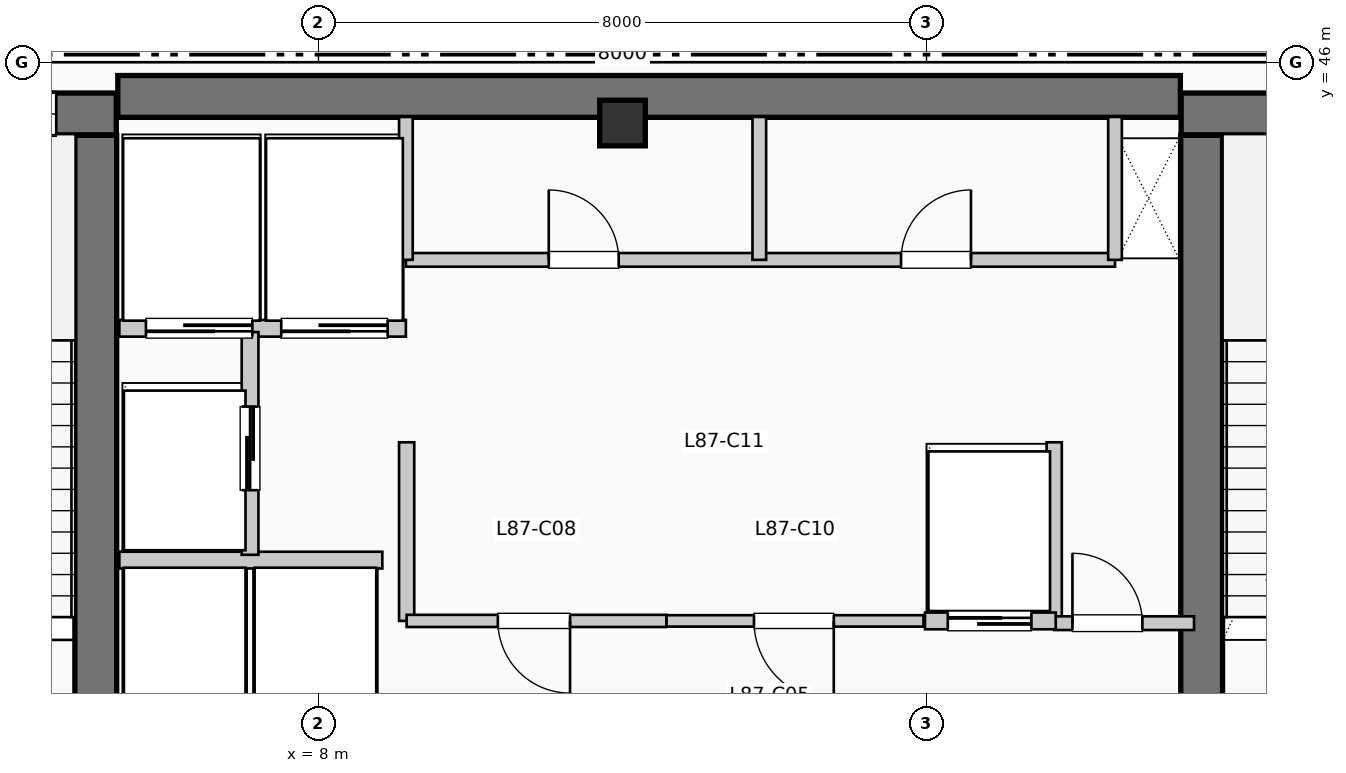
"""IFC4 building model, lengths in metres.
Left out: names, types, materials, properties, quantities, classifications, styles, units other than length and angle.
Written with IfcOpenShell. Run it as: python <this file> out.ifc"""

import sys

from ifc_helpers import new_model, si_unit, direction, frame, frame_2d, origin, origin_2d, place, context, subcontext, project, spatial, rectangle, extrude, element, fill, save


model = new_model("IFC4")
c1 = context("Model", 3, precision=1e-05, world=origin(), true_north=direction((0.0, 1.0)))
c2 = subcontext(c1, "Body", "Model", "MODEL_VIEW")
j1 = project(units=[si_unit("LENGTHUNIT", "METRE"), si_unit("PLANEANGLEUNIT", "RADIAN")], contexts=[c1])
p1 = place(None, origin())
s1 = spatial("IfcSite", under=j1, at=p1, CompositionType="ELEMENT")
p2 = place(p1, origin())
s2 = spatial("IfcBuilding", under=s1, at=p2, CompositionType="ELEMENT")
p3 = place(p2, frame((0.0, 0.0, 356.73)))
s3 = spatial("IfcBuildingStorey", under=s2, at=p3, CompositionType="ELEMENT", Elevation=356.73)
p4 = place(p3, frame((5.36, 45.55, 0.0), z_axis=(0.0, 0.0, 1.0), x_axis=(1.0, 0.0, 0.0)))
e1 = element("IfcWall", 1, at=p4, inside=s3, PredefinedType="SHEAR", context=c2, shape_type="SweptSolid", body=[
    extrude(rectangle(XDim=13.98, YDim=0.55, at=frame_2d((6.99, 0.0))), origin(), (0.0, 0.0, 1.0), 4.62),
])
p5 = place(p3, frame((5.07, 37.15, 0.0), z_axis=(0.0, 0.0, 1.0), x_axis=(0.0, 1.0, 0.0)))
e2 = element("IfcWall", 2, at=p5, inside=s3, PredefinedType="SHEAR", context=c2, shape_type="SweptSolid", body=[
    extrude(rectangle(XDim=7.89, YDim=0.55, at=frame_2d((3.945, 0.0))), origin(), (0.0, 0.0, 1.0), 4.62),
])
p6 = place(p3, frame((1.1, 45.32, 0.0), z_axis=(0.0, 0.0, 1.0), x_axis=(1.0, 0.0, 0.0)))
e3 = element("IfcWall", 3, at=p6, inside=s3, PredefinedType="SHEAR", context=c2, shape_type="SweptSolid", body=[
    extrude(rectangle(XDim=4.24, YDim=0.55, at=frame_2d((2.12, 0.0))), origin(), (0.0, 0.0, 1.0), 4.62),
])
p7 = place(p6, frame((2.05, 0.0, 1.05)))
e4 = element("IfcOpeningElement", 4, at=p7, cuts=e3, PredefinedType="OPENING", context=c2, shape_type="SweptSolid", body=[
    extrude(rectangle(XDim=1.4, YDim=1.8, at=frame_2d((0.7, 0.9))), frame((0.0, 0.285, 0.0), z_axis=(0.0, -1.0, 0.0), x_axis=(1.0, 0.0, 0.0)), (0.0, 0.0, 1.0), 0.57),
])
p8 = place(p3, frame((19.62, 37.15, 0.0), z_axis=(0.0, 0.0, 1.0), x_axis=(0.0, 1.0, 0.0)))
e5 = element("IfcWall", 5, at=p8, inside=s3, PredefinedType="SHEAR", context=c2, shape_type="SweptSolid", body=[
    extrude(rectangle(XDim=7.89, YDim=0.55, at=frame_2d((3.945, 0.0))), origin(), (0.0, 0.0, 1.0), 4.62),
])
p9 = place(p3, frame((19.35, 45.32, 0.0), z_axis=(0.0, 0.0, 1.0), x_axis=(1.0, 0.0, 0.0)))
e6 = element("IfcWall", 6, at=p9, inside=s3, PredefinedType="SHEAR", context=c2, shape_type="SweptSolid", body=[
    extrude(rectangle(XDim=3.69, YDim=0.55, at=frame_2d((1.845, 0.0))), origin(), (0.0, 0.0, 1.0), 4.62),
])
p10 = place(p9, frame((1.15, 0.0, 1.05)))
e7 = element("IfcOpeningElement", 7, at=p10, cuts=e6, PredefinedType="OPENING", context=c2, shape_type="SweptSolid", body=[
    extrude(rectangle(XDim=1.4, YDim=1.8, at=frame_2d((0.7, 0.9))), frame((0.0, 0.285, 0.0), z_axis=(0.0, -1.0, 0.0), x_axis=(1.0, 0.0, 0.0)), (0.0, 0.0, 1.0), 0.57),
])
p11 = place(p3, frame((12.0, 45.2, 0.0), z_axis=(0.0, 0.0, 1.0), x_axis=(1.0, 0.0, 0.0)))
e8 = element("IfcColumn", 8, at=p11, inside=s3, PredefinedType="COLUMN", context=c2, shape_type="SweptSolid", body=[
    extrude(rectangle(XDim=0.6, YDim=0.6, at=origin_2d()), origin(), (0.0, 0.0, 1.0), 4.62),
])
p12 = place(p3, frame((5.38, 39.45, 0.0), z_axis=(0.0, 0.0, 1.0), x_axis=(1.0, 0.0, 0.0)))
e9 = element("IfcWall", 9, at=p12, inside=s3, PredefinedType="PARTITIONING", context=c2, shape_type="SweptSolid", body=[
    extrude(rectangle(XDim=3.46, YDim=0.22, at=frame_2d((1.73, 0.0))), origin(), (0.0, 0.0, 1.0), 4.37),
])
p13 = place(p3, frame((5.38, 42.5, 0.0), z_axis=(0.0, 0.0, 1.0), x_axis=(1.0, 0.0, 0.0)))
e10 = element("IfcWall", 10, at=p13, inside=s3, PredefinedType="PARTITIONING", context=c2, shape_type="SweptSolid", body=[
    extrude(rectangle(XDim=3.77, YDim=0.22, at=frame_2d((1.885, 0.0))), origin(), (0.0, 0.0, 1.0), 4.37),
])
p14 = place(p13, frame((1.75, 0.0, 0.0), z_axis=(0.0, 0.0, 1.0), x_axis=(-1.0, 0.0, 0.0)))
e11 = element("IfcOpeningElement", 11, at=p14, cuts=e10, PredefinedType="OPENING", context=c2, shape_type="SweptSolid", body=[
    extrude(rectangle(XDim=1.4, YDim=2.2, at=frame_2d((0.7, 1.1))), frame((0.0, 0.12, 0.0), z_axis=(0.0, -1.0, 0.0), x_axis=(1.0, 0.0, 0.0)), (0.0, 0.0, 1.0), 0.24),
])
p15 = place(p13, frame((3.53, 0.0, 0.0), z_axis=(0.0, 0.0, 1.0), x_axis=(-1.0, 0.0, 0.0)))
e12 = element("IfcOpeningElement", 12, at=p15, cuts=e10, PredefinedType="OPENING", context=c2, shape_type="SweptSolid", body=[
    extrude(rectangle(XDim=1.4, YDim=2.2, at=frame_2d((0.7, 1.1))), frame((0.0, 0.12, 0.0), z_axis=(0.0, -1.0, 0.0), x_axis=(1.0, 0.0, 0.0)), (0.0, 0.0, 1.0), 0.24),
])
p16 = place(p3, frame((7.1, 39.52, 0.0), z_axis=(0.0, 0.0, 1.0), x_axis=(0.0, 1.0, 0.0)))
e13 = element("IfcWall", 13, at=p16, inside=s3, PredefinedType="PARTITIONING", context=c2, shape_type="SweptSolid", body=[
    extrude(rectangle(XDim=2.93, YDim=0.22, at=frame_2d((1.465, 0.0))), origin(), (0.0, 0.0, 1.0), 4.37),
])
p17 = place(p16, frame((0.85, 0.0, 0.0)))
e14 = element("IfcOpeningElement", 14, at=p17, cuts=e13, PredefinedType="OPENING", context=c2, shape_type="SweptSolid", body=[
    extrude(rectangle(XDim=1.1, YDim=2.2, at=frame_2d((0.55, 1.1))), frame((0.0, 0.12, 0.0), z_axis=(0.0, -1.0, 0.0), x_axis=(1.0, 0.0, 0.0)), (0.0, 0.0, 1.0), 0.24),
])
for number, where, z_axis, x_axis in (
    (15, (9.16, 38.65, 0.0), (0.0, 0.0, 1.0), (0.0, 1.0, 0.0)),
    (16, (17.68, 38.65, 0.0), (0.0, 0.0, 1.0), (0.0, 1.0, 0.0)),
):
    element("IfcWall", number, at=place(p3, frame(where, z_axis=z_axis, x_axis=x_axis)), inside=s3, PredefinedType="PARTITIONING", context=c2, shape_type="SweptSolid", body=[
        extrude(rectangle(XDim=2.35, YDim=0.2, at=frame_2d((1.175, 0.0))), origin(), (0.0, 0.0, 1.0), 4.37),
    ])
p18 = place(p3, frame((17.68, 38.62, 0.0), z_axis=(0.0, 0.0, 1.0), x_axis=(1.0, 0.0, 0.0)))
e17 = element("IfcWall", 17, at=p18, inside=s3, PredefinedType="PARTITIONING", context=c2, shape_type="SweptSolid", body=[
    extrude(rectangle(XDim=1.84, YDim=0.18, at=frame_2d((0.92, 0.0))), origin(), (0.0, 0.0, 1.0), 4.37),
])
p19 = place(p18, frame((0.24, 0.0, 0.0)))
e18 = element("IfcOpeningElement", 18, at=p19, cuts=e17, PredefinedType="OPENING", context=c2, shape_type="SweptSolid", body=[
    extrude(rectangle(XDim=0.92, YDim=2.1, at=frame_2d((0.46, 1.05))), frame((0.0, 0.1, 0.0), z_axis=(0.0, -1.0, 0.0), x_axis=(1.0, 0.0, 0.0)), (0.0, 0.0, 1.0), 0.2),
])
p20 = place(p3, frame((9.16, 38.65, 0.0), z_axis=(0.0, 0.0, 1.0), x_axis=(1.0, 0.0, 0.0)))
e19 = element("IfcWall", 19, at=p20, inside=s3, PredefinedType="PARTITIONING", context=c2, shape_type="SweptSolid", body=[
    extrude(rectangle(XDim=3.42, YDim=0.16, at=frame_2d((1.71, 0.0))), origin(), (0.0, 0.0, 1.0), 4.37),
])
p21 = place(p20, frame((2.15, 0.0, 0.0), z_axis=(0.0, 0.0, 1.0), x_axis=(-1.0, 0.0, 0.0)))
e20 = element("IfcOpeningElement", 20, at=p21, cuts=e19, PredefinedType="OPENING", context=c2, shape_type="SweptSolid", body=[
    extrude(rectangle(XDim=0.95, YDim=2.15, at=frame_2d((0.475, 1.075))), frame((0.0, 0.09, 0.0), z_axis=(0.0, -1.0, 0.0), x_axis=(1.0, 0.0, 0.0)), (0.0, 0.0, 1.0), 0.18),
])
p22 = place(p3, frame((12.58, 38.65, 0.0), z_axis=(0.0, 0.0, 1.0), x_axis=(1.0, 0.0, 0.0)))
e21 = element("IfcWall", 21, at=p22, inside=s3, PredefinedType="PARTITIONING", context=c2, shape_type="SweptSolid", body=[
    extrude(rectangle(XDim=3.38, YDim=0.15, at=frame_2d((1.69, 0.0))), origin(), (0.0, 0.0, 1.0), 4.37),
])
p23 = place(p22, frame((2.2, 0.0, 0.0), z_axis=(0.0, 0.0, 1.0), x_axis=(-1.0, 0.0, 0.0)))
e22 = element("IfcOpeningElement", 22, at=p23, cuts=e21, PredefinedType="OPENING", context=c2, shape_type="SweptSolid", body=[
    extrude(rectangle(XDim=1.05, YDim=2.15, at=frame_2d((0.525, 1.075))), frame((0.0, 0.085, 0.0), z_axis=(0.0, -1.0, 0.0), x_axis=(1.0, 0.0, 0.0)), (0.0, 0.0, 1.0), 0.17),
])
p24 = place(p3, frame((15.98, 38.65, 0.0), z_axis=(0.0, 0.0, 1.0), x_axis=(1.0, 0.0, 0.0)))
e23 = element("IfcWall", 23, at=p24, inside=s3, PredefinedType="PARTITIONING", context=c2, shape_type="SweptSolid", body=[
    extrude(rectangle(XDim=1.72, YDim=0.22, at=frame_2d((0.86, 0.0))), origin(), (0.0, 0.0, 1.0), 4.37),
])
p25 = place(p24, frame((0.3, 0.0, 0.0)))
e24 = element("IfcOpeningElement", 24, at=p25, cuts=e23, PredefinedType="OPENING", context=c2, shape_type="SweptSolid", body=[
    extrude(rectangle(XDim=1.1, YDim=2.2, at=frame_2d((0.55, 1.1))), frame((0.0, 0.12, 0.0), z_axis=(0.0, -1.0, 0.0), x_axis=(1.0, 0.0, 0.0)), (0.0, 0.0, 1.0), 0.24),
])
p26 = place(p3, frame((9.15, 43.4, 0.0), z_axis=(0.0, 0.0, 1.0), x_axis=(1.0, 0.0, 0.0)))
e25 = element("IfcWall", 25, at=p26, inside=s3, PredefinedType="PLUMBINGWALL", context=c2, shape_type="SweptSolid", body=[
    extrude(rectangle(XDim=9.33, YDim=0.18, at=frame_2d((4.665, 0.0))), origin(), (0.0, 0.0, 1.0), 4.37),
])
p27 = place(p26, frame((1.88, 0.0, 0.0)))
e26 = element("IfcOpeningElement", 26, at=p27, cuts=e25, PredefinedType="OPENING", context=c2, shape_type="SweptSolid", body=[
    extrude(rectangle(XDim=0.92, YDim=2.1, at=frame_2d((0.46, 1.05))), frame((0.0, 0.1, 0.0), z_axis=(0.0, -1.0, 0.0), x_axis=(1.0, 0.0, 0.0)), (0.0, 0.0, 1.0), 0.2),
])
p28 = place(p26, frame((6.515, 0.0, 0.0)))
e27 = element("IfcOpeningElement", 27, at=p28, cuts=e25, PredefinedType="OPENING", context=c2, shape_type="SweptSolid", body=[
    extrude(rectangle(XDim=0.92, YDim=2.1, at=frame_2d((0.46, 1.05))), frame((0.0, 0.1, 0.0), z_axis=(0.0, -1.0, 0.0), x_axis=(1.0, 0.0, 0.0)), (0.0, 0.0, 1.0), 0.2),
])
for number, where, z_axis, x_axis in (
    (28, (9.15, 43.4, 0.0), (0.0, 0.0, 1.0), (0.0, 1.0, 0.0)),
    (29, (18.48, 43.4, 0.0), (0.0, 0.0, 1.0), (0.0, 1.0, 0.0)),
    (30, (13.8, 43.4, 0.0), (0.0, 0.0, 1.0), (0.0, 1.0, 0.0)),
):
    element("IfcWall", number, at=place(p3, frame(where, z_axis=z_axis, x_axis=x_axis)), inside=s3, PredefinedType="PLUMBINGWALL", context=c2, shape_type="SweptSolid", body=[
        extrude(rectangle(XDim=1.88, YDim=0.18, at=frame_2d((0.94, 0.0))), origin(), (0.0, 0.0, 1.0), 4.37),
    ])
p29 = place(p7, origin())
e31 = element("IfcWindow", 31, at=p29, inside=s3, PartitioningType="SINGLE_PANEL", PredefinedType="WINDOW", context=c2, shape_type="SweptSolid", body=[
    extrude(rectangle(XDim=1.4, YDim=1.8, at=frame_2d((0.7, 0.9))), frame((0.0, 0.03, 0.0), z_axis=(0.0, -1.0, 0.0), x_axis=(1.0, 0.0, 0.0)), (0.0, 0.0, 1.0), 0.06),
])
fill(e4, e31)
p30 = place(p14, origin())
e32 = element("IfcDoor", 32, at=p30, inside=s3, OperationType="SLIDING_TO_LEFT", PredefinedType="DOOR", context=c2, shape_type="SweptSolid", body=[
    extrude(rectangle(XDim=1.4, YDim=2.2, at=frame_2d((0.7, 1.1))), frame((0.0, 0.025, 0.0), z_axis=(0.0, -1.0, 0.0), x_axis=(1.0, 0.0, 0.0)), (0.0, 0.0, 1.0), 0.05),
])
fill(e11, e32)
p31 = place(p15, origin())
e33 = element("IfcDoor", 33, at=p31, inside=s3, OperationType="SLIDING_TO_LEFT", PredefinedType="DOOR", context=c2, shape_type="SweptSolid", body=[
    extrude(rectangle(XDim=1.4, YDim=2.2, at=frame_2d((0.7, 1.1))), frame((0.0, 0.025, 0.0), z_axis=(0.0, -1.0, 0.0), x_axis=(1.0, 0.0, 0.0)), (0.0, 0.0, 1.0), 0.05),
])
fill(e12, e33)
p32 = place(p17, origin())
e34 = element("IfcDoor", 34, at=p32, inside=s3, OperationType="SLIDING_TO_LEFT", PredefinedType="DOOR", context=c2, shape_type="SweptSolid", body=[
    extrude(rectangle(XDim=1.1, YDim=2.2, at=frame_2d((0.55, 1.1))), frame((0.0, 0.025, 0.0), z_axis=(0.0, -1.0, 0.0), x_axis=(1.0, 0.0, 0.0)), (0.0, 0.0, 1.0), 0.05),
])
fill(e14, e34)
p33 = place(p19, origin())
e35 = element("IfcDoor", 35, at=p33, inside=s3, OperationType="SINGLE_SWING_LEFT", PredefinedType="DOOR", context=c2, shape_type="SweptSolid", body=[
    extrude(rectangle(XDim=0.92, YDim=2.1, at=frame_2d((0.46, 1.05))), frame((0.0, 0.025, 0.0), z_axis=(0.0, -1.0, 0.0), x_axis=(1.0, 0.0, 0.0)), (0.0, 0.0, 1.0), 0.05),
])
fill(e18, e35)
p34 = place(p21, origin())
e36 = element("IfcDoor", 36, at=p34, inside=s3, OperationType="SINGLE_SWING_RIGHT", PredefinedType="DOOR", context=c2, shape_type="SweptSolid", body=[
    extrude(rectangle(XDim=0.95, YDim=2.15, at=frame_2d((0.475, 1.075))), frame((0.0, 0.025, 0.0), z_axis=(0.0, -1.0, 0.0), x_axis=(1.0, 0.0, 0.0)), (0.0, 0.0, 1.0), 0.05),
])
fill(e20, e36)
p35 = place(p23, origin())
e37 = element("IfcDoor", 37, at=p35, inside=s3, OperationType="SINGLE_SWING_RIGHT", PredefinedType="DOOR", context=c2, shape_type="SweptSolid", body=[
    extrude(rectangle(XDim=1.05, YDim=2.15, at=frame_2d((0.525, 1.075))), frame((0.0, 0.025, 0.0), z_axis=(0.0, -1.0, 0.0), x_axis=(1.0, 0.0, 0.0)), (0.0, 0.0, 1.0), 0.05),
])
fill(e22, e37)
p36 = place(p25, origin())
e38 = element("IfcDoor", 38, at=p36, inside=s3, OperationType="SLIDING_TO_LEFT", PredefinedType="DOOR", context=c2, shape_type="SweptSolid", body=[
    extrude(rectangle(XDim=1.1, YDim=2.2, at=frame_2d((0.55, 1.1))), frame((0.0, 0.025, 0.0), z_axis=(0.0, -1.0, 0.0), x_axis=(1.0, 0.0, 0.0)), (0.0, 0.0, 1.0), 0.05),
])
fill(e24, e38)
p37 = place(p27, origin())
e39 = element("IfcDoor", 39, at=p37, inside=s3, OperationType="SINGLE_SWING_LEFT", PredefinedType="DOOR", context=c2, shape_type="SweptSolid", body=[
    extrude(rectangle(XDim=0.92, YDim=2.1, at=frame_2d((0.46, 1.05))), frame((0.0, 0.025, 0.0), z_axis=(0.0, -1.0, 0.0), x_axis=(1.0, 0.0, 0.0)), (0.0, 0.0, 1.0), 0.05),
])
fill(e26, e39)
p38 = place(p28, origin())
e40 = element("IfcDoor", 40, at=p38, inside=s3, OperationType="SINGLE_SWING_RIGHT", PredefinedType="DOOR", context=c2, shape_type="SweptSolid", body=[
    extrude(rectangle(XDim=0.92, YDim=2.1, at=frame_2d((0.46, 1.05))), frame((0.0, 0.025, 0.0), z_axis=(0.0, -1.0, 0.0), x_axis=(1.0, 0.0, 0.0)), (0.0, 0.0, 1.0), 0.05),
])
fill(e27, e40)
save(model, sys.argv[1])
